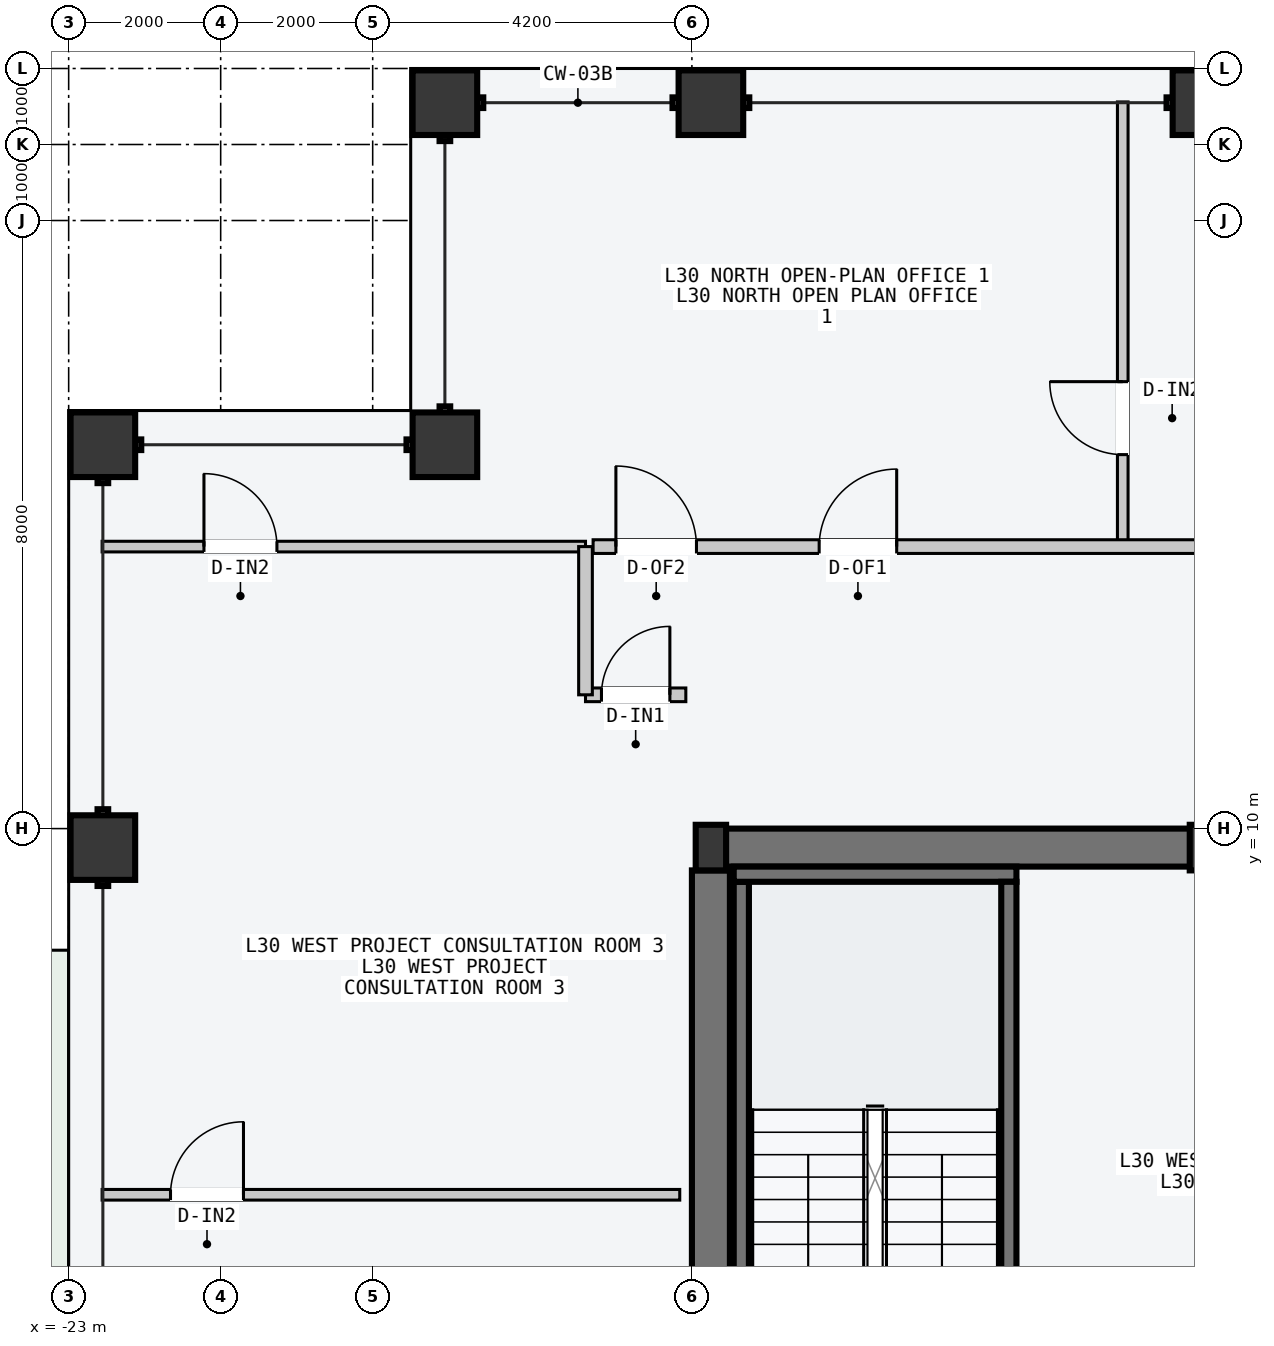
"""IFC4 building model, lengths in metres.
Left out: names, types, materials, properties, quantities, classifications, styles, units other than length and angle.
Written with IfcOpenShell. Run it as: python <this file> out.ifc"""

import sys

from ifc_helpers import new_model, si_unit, direction, frame, frame_2d, origin, origin_2d, place, context, subcontext, project, spatial, rectangle, hollow_rectangle, i_section, extrude, element, fill, save


model = new_model("IFC4")
c1 = context("Model", 3, precision=1e-05, world=origin(), true_north=direction((0.0, 1.0)))
c2 = subcontext(c1, "Body", "Model", "MODEL_VIEW")
j1 = project(units=[si_unit("LENGTHUNIT", "METRE"), si_unit("PLANEANGLEUNIT", "RADIAN")], contexts=[c1])
p1 = place(None, origin())
s1 = spatial("IfcSite", under=j1, at=p1, CompositionType="ELEMENT")
p2 = place(p1, origin())
s2 = spatial("IfcBuilding", under=s1, at=p2, CompositionType="ELEMENT")
p3 = place(p2, frame((0.0, 0.0, 117.0)))
s3 = spatial("IfcBuildingStorey", under=s2, at=p3, CompositionType="ELEMENT", Elevation=117.0)
p4 = place(p3, frame((-14.53, 9.75, -0.2), z_axis=(0.0, 0.0, 1.0), x_axis=(1.0, 0.0, 0.0)))
e1 = element("IfcWall", 1, at=p4, inside=s3, PredefinedType="SHEAR", context=c2, shape_type="SweptSolid", body=[
    extrude(rectangle(XDim=6.46, YDim=0.5, at=frame_2d((3.23, 0.0))), origin(), (0.0, 0.0, 1.0), 3.6),
])
p5 = place(p3, frame((-14.55, 0.3, -0.2), z_axis=(0.0, 0.0, 1.0), x_axis=(0.0, 1.0, 0.0)))
e2 = element("IfcWall", 2, at=p5, inside=s3, PredefinedType="SHEAR", context=c2, shape_type="SweptSolid", body=[
    extrude(rectangle(XDim=9.15, YDim=0.5, at=frame_2d((4.575, 0.0))), origin(), (0.0, 0.0, 1.0), 3.6),
])
p6 = place(p3, frame((-14.15, 1.5, -0.2), z_axis=(0.0, 0.0, 1.0), x_axis=(0.0, 1.0, 0.0)))
e3 = element("IfcWall", 3, at=p6, inside=s3, PredefinedType="SOLIDWALL", context=c2, shape_type="SweptSolid", body=[
    extrude(rectangle(XDim=7.8, YDim=0.2, at=frame_2d((3.9, 0.0))), origin(), (0.0, 0.0, 1.0), 3.6),
])
p7 = place(p3, frame((-14.25, 9.4, -0.2), z_axis=(0.0, 0.0, 1.0), x_axis=(1.0, 0.0, 0.0)))
e4 = element("IfcWall", 4, at=p7, inside=s3, PredefinedType="SOLIDWALL", context=c2, shape_type="SweptSolid", body=[
    extrude(rectangle(XDim=3.72, YDim=0.2, at=frame_2d((1.86, 0.0))), origin(), (0.0, 0.0, 1.0), 3.6),
])
p8 = place(p3, frame((-10.63, 1.5, -0.2), z_axis=(0.0, 0.0, 1.0), x_axis=(0.0, 1.0, 0.0)))
e5 = element("IfcWall", 5, at=p8, inside=s3, PredefinedType="SOLIDWALL", context=c2, shape_type="SweptSolid", body=[
    extrude(rectangle(XDim=7.8, YDim=0.2, at=frame_2d((3.9, 0.0))), origin(), (0.0, 0.0, 1.0), 3.6),
])
for number, where, z_axis, x_axis in (
    (6, (-14.55, 9.75, 0.0), (0.0, 0.0, 1.0), (1.0, 0.0, 0.0)),
    (7, (-8.05, 9.75, 0.0), (0.0, 0.0, 1.0), (1.0, 0.0, 0.0)),
):
    element("IfcColumn", number, at=place(p3, frame(where, z_axis=z_axis, x_axis=x_axis)), inside=s3, PredefinedType="COLUMN", context=c2, shape_type="SweptSolid", body=[
        extrude(i_section(OverallWidth=0.4, OverallDepth=0.6, WebThickness=0.022, FlangeThickness=0.036, at=origin_2d()), origin(), (0.0, 0.0, 1.0), 3.6),
    ])
for number, where, z_axis, x_axis in (
    (8, (-18.05, 19.55, 0.0), (0.0, 0.0, 1.0), (1.0, 0.0, 0.0)),
    (9, (-14.55, 19.55, 0.0), (0.0, 0.0, 1.0), (1.0, 0.0, 0.0)),
    (10, (-8.05, 19.55, 0.0), (0.0, 0.0, 1.0), (1.0, 0.0, 0.0)),
    (11, (-22.55, 9.75, 0.0), (0.0, 0.0, 1.0), (0.0, 1.0, 0.0)),
    (12, (-22.55, 15.05, 0.0), (0.0, 0.0, 1.0), (0.0, 1.0, 0.0)),
    (13, (-18.05, 15.05, 0.0), (0.0, 0.0, 1.0), (1.0, 0.0, 0.0)),
):
    element("IfcColumn", number, at=place(p3, frame(where, z_axis=z_axis, x_axis=x_axis)), inside=s3, PredefinedType="COLUMN", context=c2, shape_type="SweptSolid", body=[
        extrude(hollow_rectangle(XDim=0.85, YDim=0.85, WallThickness=0.04, at=origin_2d()), origin(), (0.0, 0.0, 1.0), 3.6),
    ])
p9 = place(p3, frame((-9.131, 13.77, 0.0), z_axis=(0.0, 0.0, 1.0), x_axis=(0.0, 1.0, 0.0)))
e14 = element("IfcWall", 14, at=p9, inside=s3, PredefinedType="PARTITIONING", context=c2, shape_type="SweptSolid", body=[
    extrude(rectangle(XDim=5.79, YDim=0.14, at=frame_2d((2.895, 0.0))), origin(), (0.0, 0.0, 1.0), 3.4),
])
p10 = place(p9, frame((1.15, 0.0, 0.0)))
e15 = element("IfcOpeningElement", 15, at=p10, cuts=e14, PredefinedType="OPENING", context=c2, shape_type="SweptSolid", body=[
    extrude(rectangle(XDim=0.96, YDim=2.18, at=frame_2d((0.48, 1.09))), frame((0.0, 0.08, 0.0), z_axis=(0.0, -1.0, 0.0), x_axis=(1.0, 0.0, 0.0)), (0.0, 0.0, 1.0), 0.16),
])
p11 = place(p3, frame((-16.1, 13.71, 0.0), z_axis=(0.0, 0.0, 1.0), x_axis=(1.0, 0.0, 0.0)))
e16 = element("IfcWall", 16, at=p11, inside=s3, PredefinedType="PARTITIONING", context=c2, shape_type="SweptSolid", body=[
    extrude(rectangle(XDim=32.2, YDim=0.18, at=frame_2d((16.1, 0.0))), origin(), (0.0, 0.0, 1.0), 3.4),
])
p12 = place(p11, frame((2.974, 0.0, 0.0)))
e17 = element("IfcOpeningElement", 17, at=p12, cuts=e16, PredefinedType="OPENING", context=c2, shape_type="SweptSolid", body=[
    extrude(rectangle(XDim=1.02, YDim=2.2, at=frame_2d((0.51, 1.1))), frame((0.0, 0.1, 0.0), z_axis=(0.0, -1.0, 0.0), x_axis=(1.0, 0.0, 0.0)), (0.0, 0.0, 1.0), 0.2),
])
p13 = place(p11, frame((0.3, 0.0, 0.0)))
e18 = element("IfcOpeningElement", 18, at=p13, cuts=e16, PredefinedType="OPENING", context=c2, shape_type="SweptSolid", body=[
    extrude(rectangle(XDim=1.06, YDim=2.2, at=frame_2d((0.53, 1.1))), frame((0.0, 0.1, 0.0), z_axis=(0.0, -1.0, 0.0), x_axis=(1.0, 0.0, 0.0)), (0.0, 0.0, 1.0), 0.2),
])
p14 = place(p11, frame((24.714, 0.0, 0.0)))
e19 = element("IfcOpeningElement", 19, at=p14, cuts=e16, PredefinedType="OPENING", context=c2, shape_type="SweptSolid", body=[
    extrude(rectangle(XDim=1.24, YDim=2.24, at=frame_2d((0.62, 1.12))), frame((0.0, 0.1, 0.0), z_axis=(0.0, -1.0, 0.0), x_axis=(1.0, 0.0, 0.0)), (0.0, 0.0, 1.0), 0.2),
])
p15 = place(p3, frame((-22.56, 13.71, 0.0), z_axis=(0.0, 0.0, 1.0), x_axis=(1.0, 0.0, 0.0)))
e20 = element("IfcWall", 20, at=p15, inside=s3, PredefinedType="PARTITIONING", context=c2, shape_type="SweptSolid", body=[
    extrude(rectangle(XDim=6.36, YDim=0.14, at=frame_2d((3.18, 0.0))), origin(), (0.0, 0.0, 1.0), 3.4),
])
p16 = place(p15, frame((1.34, 0.0, 0.0)))
e21 = element("IfcOpeningElement", 21, at=p16, cuts=e20, PredefinedType="OPENING", context=c2, shape_type="SweptSolid", body=[
    extrude(rectangle(XDim=0.96, YDim=2.18, at=frame_2d((0.48, 1.09))), frame((0.0, 0.08, 0.0), z_axis=(0.0, -1.0, 0.0), x_axis=(1.0, 0.0, 0.0)), (0.0, 0.0, 1.0), 0.16),
])
p17 = place(p3, frame((-16.2, 11.76, 0.0), z_axis=(0.0, 0.0, 1.0), x_axis=(1.0, 0.0, 0.0)))
e22 = element("IfcWall", 22, at=p17, inside=s3, PredefinedType="PARTITIONING", context=c2, shape_type="SweptSolid", body=[
    extrude(rectangle(XDim=1.32, YDim=0.18, at=frame_2d((0.66, 0.0))), origin(), (0.0, 0.0, 1.0), 3.4),
])
p18 = place(p17, frame((0.21, 0.0, 0.0)))
e23 = element("IfcOpeningElement", 23, at=p18, cuts=e22, PredefinedType="OPENING", context=c2, shape_type="SweptSolid", body=[
    extrude(rectangle(XDim=0.9, YDim=2.15, at=frame_2d((0.45, 1.075))), frame((0.0, 0.1, 0.0), z_axis=(0.0, -1.0, 0.0), x_axis=(1.0, 0.0, 0.0)), (0.0, 0.0, 1.0), 0.2),
])
p19 = place(p3, frame((-16.2, 11.76, 0.0), z_axis=(0.0, 0.0, 1.0), x_axis=(0.0, 1.0, 0.0)))
e24 = element("IfcWall", 24, at=p19, inside=s3, PredefinedType="PARTITIONING", context=c2, shape_type="SweptSolid", body=[
    extrude(rectangle(XDim=1.95, YDim=0.18, at=frame_2d((0.975, 0.0))), origin(), (0.0, 0.0, 1.0), 3.4),
])
p20 = place(p3, frame((-22.56, 5.183, 0.0), z_axis=(0.0, 0.0, 1.0), x_axis=(1.0, 0.0, 0.0)))
e25 = element("IfcWall", 25, at=p20, inside=s3, PredefinedType="PARTITIONING", context=c2, shape_type="SweptSolid", body=[
    extrude(rectangle(XDim=7.6, YDim=0.14, at=frame_2d((3.8, 0.0))), origin(), (0.0, 0.0, 1.0), 3.4),
])
p21 = place(p20, frame((0.9, 0.0, 0.0)))
e26 = element("IfcOpeningElement", 26, at=p21, cuts=e25, PredefinedType="OPENING", context=c2, shape_type="SweptSolid", body=[
    extrude(rectangle(XDim=0.96, YDim=2.18, at=frame_2d((0.48, 1.09))), frame((0.0, 0.08, 0.0), z_axis=(0.0, -1.0, 0.0), x_axis=(1.0, 0.0, 0.0)), (0.0, 0.0, 1.0), 0.16),
])
p22 = place(p10, origin())
e27 = element("IfcDoor", 27, at=p22, inside=s3, OperationType="SINGLE_SWING_RIGHT", PredefinedType="DOOR", context=c2, shape_type="SweptSolid", body=[
    extrude(rectangle(XDim=0.96, YDim=2.18, at=frame_2d((0.48, 1.09))), frame((0.0, 0.025, 0.0), z_axis=(0.0, -1.0, 0.0), x_axis=(1.0, 0.0, 0.0)), (0.0, 0.0, 1.0), 0.05),
])
fill(e15, e27)
p23 = place(p12, origin())
e28 = element("IfcDoor", 28, at=p23, inside=s3, OperationType="SINGLE_SWING_RIGHT", PredefinedType="DOOR", context=c2, shape_type="SweptSolid", body=[
    extrude(rectangle(XDim=1.02, YDim=2.2, at=frame_2d((0.51, 1.1))), frame((0.0, 0.025, 0.0), z_axis=(0.0, -1.0, 0.0), x_axis=(1.0, 0.0, 0.0)), (0.0, 0.0, 1.0), 0.05),
])
fill(e17, e28)
p24 = place(p13, origin())
e29 = element("IfcDoor", 29, at=p24, inside=s3, OperationType="SINGLE_SWING_LEFT", PredefinedType="DOOR", context=c2, shape_type="SweptSolid", body=[
    extrude(rectangle(XDim=1.06, YDim=2.2, at=frame_2d((0.53, 1.1))), frame((0.0, 0.025, 0.0), z_axis=(0.0, -1.0, 0.0), x_axis=(1.0, 0.0, 0.0)), (0.0, 0.0, 1.0), 0.05),
])
fill(e18, e29)
p25 = place(p16, origin())
e30 = element("IfcDoor", 30, at=p25, inside=s3, OperationType="SINGLE_SWING_LEFT", PredefinedType="DOOR", context=c2, shape_type="SweptSolid", body=[
    extrude(rectangle(XDim=0.96, YDim=2.18, at=frame_2d((0.48, 1.09))), frame((0.0, 0.025, 0.0), z_axis=(0.0, -1.0, 0.0), x_axis=(1.0, 0.0, 0.0)), (0.0, 0.0, 1.0), 0.05),
])
fill(e21, e30)
p26 = place(p18, origin())
e31 = element("IfcDoor", 31, at=p26, inside=s3, OperationType="SINGLE_SWING_RIGHT", PredefinedType="DOOR", context=c2, shape_type="SweptSolid", body=[
    extrude(rectangle(XDim=0.9, YDim=2.15, at=frame_2d((0.45, 1.075))), frame((0.0, 0.025, 0.0), z_axis=(0.0, -1.0, 0.0), x_axis=(1.0, 0.0, 0.0)), (0.0, 0.0, 1.0), 0.05),
])
fill(e23, e31)
p27 = place(p21, origin())
e32 = element("IfcDoor", 32, at=p27, inside=s3, OperationType="SINGLE_SWING_RIGHT", PredefinedType="DOOR", context=c2, shape_type="SweptSolid", body=[
    extrude(rectangle(XDim=0.96, YDim=2.18, at=frame_2d((0.48, 1.09))), frame((0.0, 0.025, 0.0), z_axis=(0.0, -1.0, 0.0), x_axis=(1.0, 0.0, 0.0)), (0.0, 0.0, 1.0), 0.05),
])
fill(e26, e32)
save(model, sys.argv[1])
